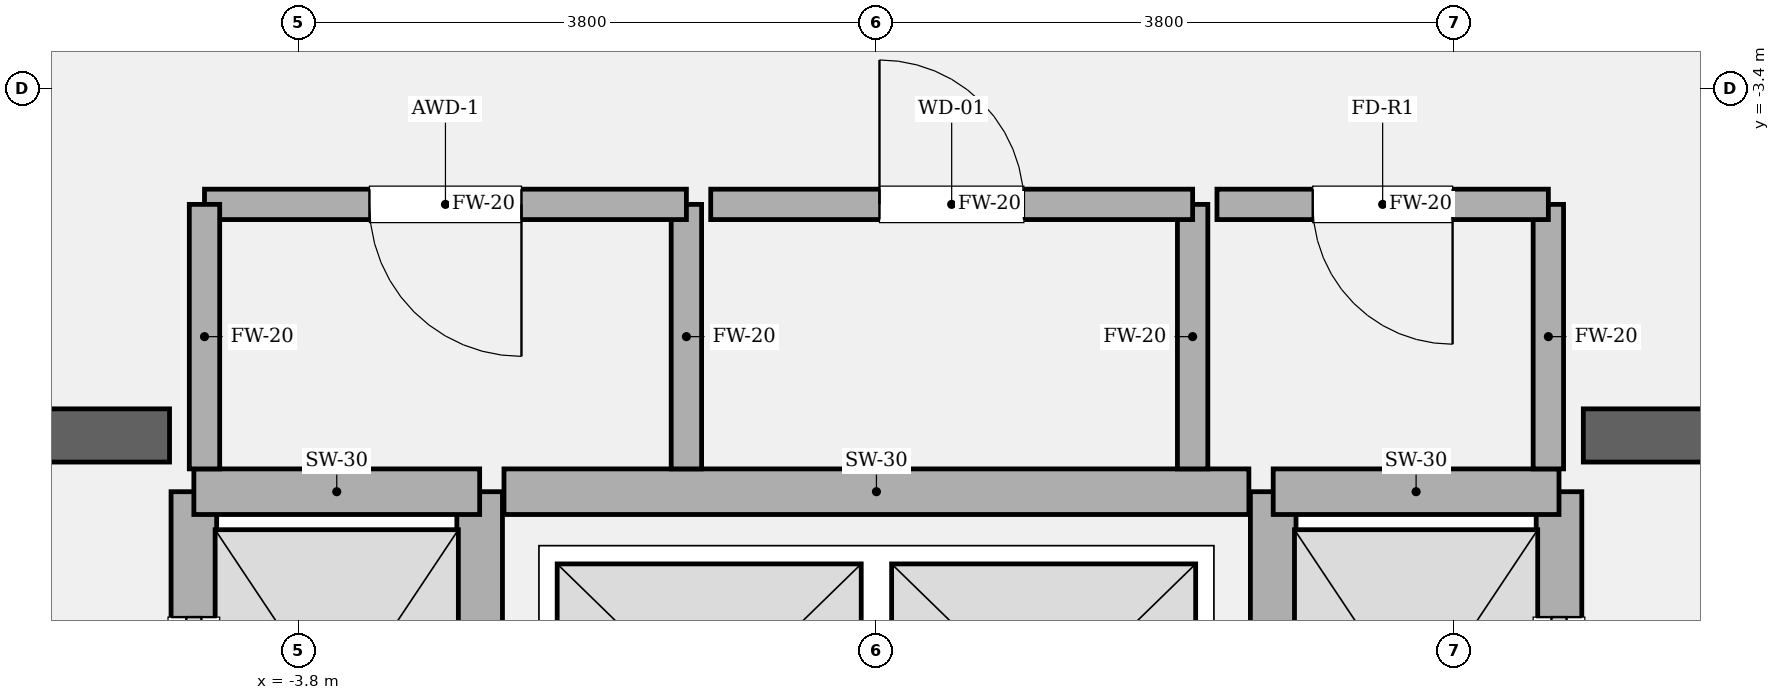
"""IFC4 building model, lengths in metres.
Left out: names, types, materials, properties, quantities, classifications, styles, units other than length and angle.
Written with IfcOpenShell. Run it as: python <this file> out.ifc"""

import sys

from ifc_helpers import new_model, si_unit, direction, frame, frame_2d, origin, place, context, subcontext, project, spatial, rectangle, extrude, element, fill, save


model = new_model("IFC4")
c1 = context("Model", 3, precision=1e-05, world=origin(), true_north=direction((0.0, 1.0)))
c2 = subcontext(c1, "Body", "Model", "MODEL_VIEW")
j1 = project(units=[si_unit("LENGTHUNIT", "METRE"), si_unit("PLANEANGLEUNIT", "RADIAN")], contexts=[c1])
p1 = place(None, origin())
s1 = spatial("IfcSite", under=j1, at=p1, CompositionType="ELEMENT")
p2 = place(p1, origin())
s2 = spatial("IfcBuilding", under=s1, at=p2, CompositionType="ELEMENT")
p3 = place(p2, origin())
s3 = spatial("IfcBuildingStorey", under=s2, at=p3, CompositionType="ELEMENT", Elevation=0.0)
p4 = place(p3, frame((-9.825, -5.68, 0.0), z_axis=(0.0, 0.0, 1.0), x_axis=(1.0, 0.0, 0.0)))
e1 = element("IfcWall", 1, at=p4, inside=s3, PredefinedType="SOLIDWALL", context=c2, shape_type="SweptSolid", body=[
    extrude(rectangle(XDim=5.175, YDim=0.35, at=frame_2d((2.587, 0.0))), origin(), (0.0, 0.0, 1.0), 6.0),
])
p5 = place(p4, frame((1.285, 0.0, 0.0)))
e2 = element("IfcOpeningElement", 2, at=p5, cuts=e1, PredefinedType="OPENING", context=c2, shape_type="SweptSolid", body=[
    extrude(rectangle(XDim=1.18, YDim=2.2, at=frame_2d((0.59, 1.1))), frame((0.0, 0.185, 0.0), z_axis=(0.0, -1.0, 0.0), x_axis=(1.0, 0.0, 0.0)), (0.0, 0.0, 1.0), 0.37),
])
p6 = place(p3, frame((4.65, -5.68, 0.0), z_axis=(0.0, 0.0, 1.0), x_axis=(1.0, 0.0, 0.0)))
e3 = element("IfcWall", 3, at=p6, inside=s3, PredefinedType="SOLIDWALL", context=c2, shape_type="SweptSolid", body=[
    extrude(rectangle(XDim=5.175, YDim=0.35, at=frame_2d((2.587, 0.0))), origin(), (0.0, 0.0, 1.0), 6.0),
])
p7 = place(p6, frame((2.71, 0.0, 0.0)))
e4 = element("IfcOpeningElement", 4, at=p7, cuts=e3, PredefinedType="OPENING", context=c2, shape_type="SweptSolid", body=[
    extrude(rectangle(XDim=1.18, YDim=2.2, at=frame_2d((0.59, 1.1))), frame((0.0, 0.185, 0.0), z_axis=(0.0, -1.0, 0.0), x_axis=(1.0, 0.0, 0.0)), (0.0, 0.0, 1.0), 0.37),
])
p8 = place(p3, frame((-4.49, -8.82, 0.0), z_axis=(0.0, 0.0, 1.0), x_axis=(0.0, 1.0, 0.0)))
e5 = element("IfcWall", 5, at=p8, inside=s3, PredefinedType="SOLIDWALL", context=c2, shape_type="SweptSolid", body=[
    extrude(rectangle(XDim=2.77, YDim=0.3, at=frame_2d((1.385, 0.0))), origin(), (0.0, 0.0, 1.0), 5.72),
])
p9 = place(p8, frame((0.825, 0.0, 0.0)))
e6 = element("IfcOpeningElement", 6, at=p9, cuts=e5, PredefinedType="OPENING", context=c2, shape_type="SweptSolid", body=[
    extrude(rectangle(XDim=1.12, YDim=2.25, at=frame_2d((0.56, 1.125))), frame((0.0, 0.16, 0.0), z_axis=(0.0, -1.0, 0.0), x_axis=(1.0, 0.0, 0.0)), (0.0, 0.0, 1.0), 0.32),
])
p10 = place(p3, frame((-2.61, -8.82, 0.0), z_axis=(0.0, 0.0, 1.0), x_axis=(0.0, 1.0, 0.0)))
e7 = element("IfcWall", 7, at=p10, inside=s3, PredefinedType="SOLIDWALL", context=c2, shape_type="SweptSolid", body=[
    extrude(rectangle(XDim=2.77, YDim=0.3, at=frame_2d((1.385, 0.0))), origin(), (0.0, 0.0, 1.0), 5.72),
])
p11 = place(p3, frame((-4.49, -6.05, 0.0), z_axis=(0.0, 0.0, 1.0), x_axis=(1.0, 0.0, 0.0)))
e8 = element("IfcWall", 8, at=p11, inside=s3, PredefinedType="SOLIDWALL", context=c2, shape_type="SweptSolid", body=[
    extrude(rectangle(XDim=1.88, YDim=0.3, at=frame_2d((0.94, 0.0))), origin(), (0.0, 0.0, 1.0), 5.72),
])
p12 = place(p3, frame((4.49, -8.82, 0.0), z_axis=(0.0, 0.0, 1.0), x_axis=(0.0, 1.0, 0.0)))
e9 = element("IfcWall", 9, at=p12, inside=s3, PredefinedType="SOLIDWALL", context=c2, shape_type="SweptSolid", body=[
    extrude(rectangle(XDim=2.77, YDim=0.3, at=frame_2d((1.385, 0.0))), origin(), (0.0, 0.0, 1.0), 5.72),
])
p13 = place(p12, frame((0.825, 0.0, 0.0)))
e10 = element("IfcOpeningElement", 10, at=p13, cuts=e9, PredefinedType="OPENING", context=c2, shape_type="SweptSolid", body=[
    extrude(rectangle(XDim=1.12, YDim=2.25, at=frame_2d((0.56, 1.125))), frame((0.0, 0.16, 0.0), z_axis=(0.0, -1.0, 0.0), x_axis=(1.0, 0.0, 0.0)), (0.0, 0.0, 1.0), 0.32),
])
p14 = place(p3, frame((2.61, -8.82, 0.0), z_axis=(0.0, 0.0, 1.0), x_axis=(0.0, 1.0, 0.0)))
e11 = element("IfcWall", 11, at=p14, inside=s3, PredefinedType="SOLIDWALL", context=c2, shape_type="SweptSolid", body=[
    extrude(rectangle(XDim=2.77, YDim=0.3, at=frame_2d((1.385, 0.0))), origin(), (0.0, 0.0, 1.0), 5.72),
])
p15 = place(p3, frame((2.61, -6.05, 0.0), z_axis=(0.0, 0.0, 1.0), x_axis=(1.0, 0.0, 0.0)))
e12 = element("IfcWall", 12, at=p15, inside=s3, PredefinedType="SOLIDWALL", context=c2, shape_type="SweptSolid", body=[
    extrude(rectangle(XDim=1.88, YDim=0.3, at=frame_2d((0.94, 0.0))), origin(), (0.0, 0.0, 1.0), 5.72),
])
p16 = place(p3, frame((-2.45, -6.05, 0.0), z_axis=(0.0, 0.0, 1.0), x_axis=(1.0, 0.0, 0.0)))
e13 = element("IfcWall", 13, at=p16, inside=s3, PredefinedType="SOLIDWALL", context=c2, shape_type="SweptSolid", body=[
    extrude(rectangle(XDim=4.9, YDim=0.3, at=frame_2d((2.45, 0.0))), origin(), (0.0, 0.0, 1.0), 5.72),
])
p17 = place(p3, frame((-1.25, -5.9, 0.0), z_axis=(0.0, 0.0, 1.0), x_axis=(0.0, 1.0, 0.0)))
e14 = element("IfcWall", 14, at=p17, inside=s3, PredefinedType="SOLIDWALL", context=c2, shape_type="SweptSolid", body=[
    extrude(rectangle(XDim=1.74, YDim=0.2, at=frame_2d((0.87, 0.0))), origin(), (0.0, 0.0, 1.0), 5.72),
])
p18 = place(p3, frame((-1.25, -4.16, 0.0), z_axis=(0.0, 0.0, 1.0), x_axis=(-1.0, 0.0, 0.0)))
e15 = element("IfcWall", 15, at=p18, inside=s3, PredefinedType="SOLIDWALL", context=c2, shape_type="SweptSolid", body=[
    extrude(rectangle(XDim=3.17, YDim=0.2, at=frame_2d((1.585, 0.0))), origin(), (0.0, 0.0, 1.0), 5.72),
])
p19 = place(p18, frame((1.085, 0.0, 0.0)))
e16 = element("IfcOpeningElement", 16, at=p19, cuts=e15, PredefinedType="OPENING", context=c2, shape_type="SweptSolid", body=[
    extrude(rectangle(XDim=1.0, YDim=2.15, at=frame_2d((0.5, 1.075))), frame((0.0, 0.11, 0.0), z_axis=(0.0, -1.0, 0.0), x_axis=(1.0, 0.0, 0.0)), (0.0, 0.0, 1.0), 0.22),
])
for number, where, z_axis, x_axis in (
    (17, (-4.42, -4.16, 0.0), (0.0, 0.0, 1.0), (0.0, -1.0, 0.0)),
    (18, (2.08, -5.9, 0.0), (0.0, 0.0, 1.0), (0.0, 1.0, 0.0)),
):
    element("IfcWall", number, at=place(p3, frame(where, z_axis=z_axis, x_axis=x_axis)), inside=s3, PredefinedType="SOLIDWALL", context=c2, shape_type="SweptSolid", body=[
        extrude(rectangle(XDim=1.74, YDim=0.2, at=frame_2d((0.87, 0.0))), origin(), (0.0, 0.0, 1.0), 5.72),
    ])
p20 = place(p3, frame((2.08, -4.16, 0.0), z_axis=(0.0, 0.0, 1.0), x_axis=(-1.0, 0.0, 0.0)))
e19 = element("IfcWall", 19, at=p20, inside=s3, PredefinedType="SOLIDWALL", context=c2, shape_type="SweptSolid", body=[
    extrude(rectangle(XDim=3.17, YDim=0.2, at=frame_2d((1.585, 0.0))), origin(), (0.0, 0.0, 1.0), 5.72),
])
p21 = place(p20, frame((1.11, 0.0, 0.0)))
e20 = element("IfcOpeningElement", 20, at=p21, cuts=e19, PredefinedType="OPENING", context=c2, shape_type="SweptSolid", body=[
    extrude(rectangle(XDim=0.95, YDim=2.15, at=frame_2d((0.475, 1.075))), frame((0.0, 0.11, 0.0), z_axis=(0.0, -1.0, 0.0), x_axis=(1.0, 0.0, 0.0)), (0.0, 0.0, 1.0), 0.22),
])
p22 = place(p3, frame((4.42, -5.9, 0.0), z_axis=(0.0, 0.0, 1.0), x_axis=(0.0, 1.0, 0.0)))
e21 = element("IfcWall", 21, at=p22, inside=s3, PredefinedType="SOLIDWALL", context=c2, shape_type="SweptSolid", body=[
    extrude(rectangle(XDim=1.74, YDim=0.2, at=frame_2d((0.87, 0.0))), origin(), (0.0, 0.0, 1.0), 5.72),
])
p23 = place(p3, frame((4.42, -4.16, 0.0), z_axis=(0.0, 0.0, 1.0), x_axis=(-1.0, 0.0, 0.0)))
e22 = element("IfcWall", 22, at=p23, inside=s3, PredefinedType="SOLIDWALL", context=c2, shape_type="SweptSolid", body=[
    extrude(rectangle(XDim=2.18, YDim=0.2, at=frame_2d((1.09, 0.0))), origin(), (0.0, 0.0, 1.0), 5.72),
])
p24 = place(p23, frame((0.63, 0.0, 0.0)))
e23 = element("IfcOpeningElement", 23, at=p24, cuts=e22, PredefinedType="OPENING", context=c2, shape_type="SweptSolid", body=[
    extrude(rectangle(XDim=0.92, YDim=2.1, at=frame_2d((0.46, 1.05))), frame((0.0, 0.11, 0.0), z_axis=(0.0, -1.0, 0.0), x_axis=(1.0, 0.0, 0.0)), (0.0, 0.0, 1.0), 0.22),
])
p25 = place(p9, origin())
e24 = element("IfcDoor", 24, at=p25, inside=s3, OperationType="SLIDING_TO_LEFT", PredefinedType="DOOR", context=c2, shape_type="SweptSolid", body=[
    extrude(rectangle(XDim=1.12, YDim=2.25, at=frame_2d((0.56, 1.125))), frame((0.0, 0.025, 0.0), z_axis=(0.0, -1.0, 0.0), x_axis=(1.0, 0.0, 0.0)), (0.0, 0.0, 1.0), 0.05),
])
fill(e6, e24)
p26 = place(p13, origin())
e25 = element("IfcDoor", 25, at=p26, inside=s3, OperationType="SLIDING_TO_RIGHT", PredefinedType="DOOR", context=c2, shape_type="SweptSolid", body=[
    extrude(rectangle(XDim=1.12, YDim=2.25, at=frame_2d((0.56, 1.125))), frame((0.0, 0.025, 0.0), z_axis=(0.0, -1.0, 0.0), x_axis=(1.0, 0.0, 0.0)), (0.0, 0.0, 1.0), 0.05),
])
fill(e10, e25)
p27 = place(p19, origin())
e26 = element("IfcDoor", 26, at=p27, inside=s3, OperationType="SINGLE_SWING_LEFT", PredefinedType="DOOR", context=c2, shape_type="SweptSolid", body=[
    extrude(rectangle(XDim=1.0, YDim=2.15, at=frame_2d((0.5, 1.075))), frame((0.0, 0.025, 0.0), z_axis=(0.0, -1.0, 0.0), x_axis=(1.0, 0.0, 0.0)), (0.0, 0.0, 1.0), 0.05),
])
fill(e16, e26)
p28 = place(p21, origin())
e27 = element("IfcDoor", 27, at=p28, inside=s3, OperationType="SINGLE_SWING_RIGHT", PredefinedType="DOOR", context=c2, shape_type="SweptSolid", body=[
    extrude(rectangle(XDim=0.95, YDim=2.15, at=frame_2d((0.475, 1.075))), frame((0.0, 0.025, 0.0), z_axis=(0.0, -1.0, 0.0), x_axis=(1.0, 0.0, 0.0)), (0.0, 0.0, 1.0), 0.05),
])
fill(e20, e27)
p29 = place(p24, origin())
e28 = element("IfcDoor", 28, at=p29, inside=s3, OperationType="SINGLE_SWING_LEFT", PredefinedType="DOOR", context=c2, shape_type="SweptSolid", body=[
    extrude(rectangle(XDim=0.92, YDim=2.1, at=frame_2d((0.46, 1.05))), frame((0.0, 0.025, 0.0), z_axis=(0.0, -1.0, 0.0), x_axis=(1.0, 0.0, 0.0)), (0.0, 0.0, 1.0), 0.05),
])
fill(e23, e28)
save(model, sys.argv[1])
